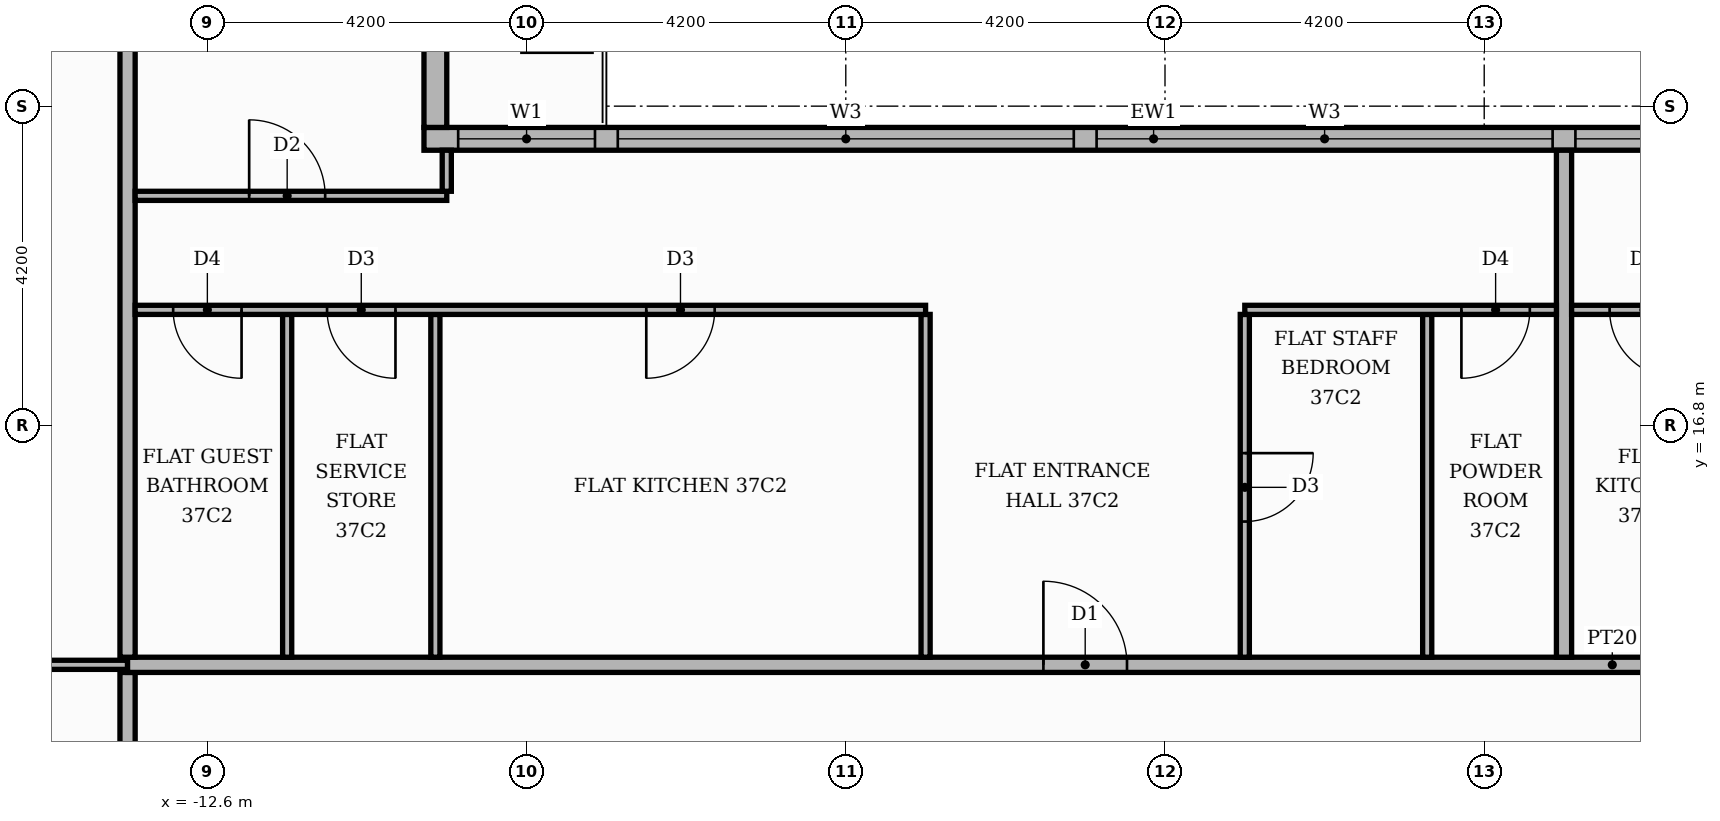
"""IFC4 building model, lengths in metres.
Left out: names, types, materials, properties, quantities, classifications, styles, units other than length and angle.
Written with IfcOpenShell. Run it as: python <this file> out.ifc"""

import sys

from ifc_helpers import new_model, si_unit, direction, frame, frame_2d, origin, place, context, subcontext, project, spatial, rectangle, extrude, element, fill, save


model = new_model("IFC4")
c1 = context("Model", 3, precision=1e-05, world=origin(), true_north=direction((0.0, 1.0)))
c2 = subcontext(c1, "Body", "Model", "MODEL_VIEW")
j1 = project(units=[si_unit("LENGTHUNIT", "METRE"), si_unit("PLANEANGLEUNIT", "RADIAN")], contexts=[c1])
p1 = place(None, origin())
s1 = spatial("IfcSite", under=j1, at=p1, CompositionType="ELEMENT")
p2 = place(p1, origin())
s2 = spatial("IfcBuilding", under=s1, at=p2, CompositionType="ELEMENT")
p3 = place(p2, frame((0.0, 0.0, 157.2)))
s3 = spatial("IfcBuildingStorey", under=s2, at=p3, CompositionType="ELEMENT", Elevation=157.2)
p4 = place(p3, frame((9.45, 20.57, 0.0), z_axis=(0.0, 0.0, 1.0), x_axis=(-1.0, 0.0, 0.0)))
e1 = element("IfcWall", 1, at=p4, inside=s3, PredefinedType="STANDARD", context=c2, shape_type="SweptSolid", body=[
    extrude(rectangle(XDim=19.2, YDim=0.3, at=frame_2d((9.6, 0.0))), origin(), (0.0, 0.0, 1.0), 3.48),
])
p5 = place(p4, frame((0.15, 0.0, 0.9)))
e2 = element("IfcOpeningElement", 2, at=p5, cuts=e1, PredefinedType="OPENING", context=c2, shape_type="SweptSolid", body=[
    extrude(rectangle(XDim=3.9, YDim=2.1, at=frame_2d((1.95, 1.05))), frame((0.0, 0.16, 0.0), z_axis=(0.0, -1.0, 0.0), x_axis=(1.0, 0.0, 0.0)), (0.0, 0.0, 1.0), 0.32),
])
p6 = place(p4, frame((4.35, 0.0, 0.9)))
e3 = element("IfcOpeningElement", 3, at=p6, cuts=e1, PredefinedType="OPENING", context=c2, shape_type="SweptSolid", body=[
    extrude(rectangle(XDim=6.0, YDim=2.1, at=frame_2d((3.0, 1.05))), frame((0.0, 0.16, 0.0), z_axis=(0.0, -1.0, 0.0), x_axis=(1.0, 0.0, 0.0)), (0.0, 0.0, 1.0), 0.32),
])
p7 = place(p4, frame((10.65, 0.0, 0.9)))
e4 = element("IfcOpeningElement", 4, at=p7, cuts=e1, PredefinedType="OPENING", context=c2, shape_type="SweptSolid", body=[
    extrude(rectangle(XDim=6.0, YDim=2.1, at=frame_2d((3.0, 1.05))), frame((0.0, 0.16, 0.0), z_axis=(0.0, -1.0, 0.0), x_axis=(1.0, 0.0, 0.0)), (0.0, 0.0, 1.0), 0.32),
])
p8 = place(p4, frame((16.95, 0.0, 0.9)))
e5 = element("IfcOpeningElement", 5, at=p8, cuts=e1, PredefinedType="OPENING", context=c2, shape_type="SweptSolid", body=[
    extrude(rectangle(XDim=1.8, YDim=2.1, at=frame_2d((0.9, 1.05))), frame((0.0, 0.16, 0.0), z_axis=(0.0, -1.0, 0.0), x_axis=(1.0, 0.0, 0.0)), (0.0, 0.0, 1.0), 0.32),
])
p9 = place(p3, frame((-9.6, 20.72, 0.0), z_axis=(0.0, 0.0, 1.0), x_axis=(0.0, 1.0, 0.0)))
e6 = element("IfcWall", 6, at=p9, inside=s3, PredefinedType="STANDARD", context=c2, shape_type="SweptSolid", body=[
    extrude(rectangle(XDim=5.0, YDim=0.3, at=frame_2d((2.5, 0.0))), origin(), (0.0, 0.0, 1.0), 3.48),
])
p10 = place(p9, frame((1.48, 0.0, 0.0)))
e7 = element("IfcOpeningElement", 7, at=p10, cuts=e6, PredefinedType="OPENING", context=c2, shape_type="SweptSolid", body=[
    extrude(rectangle(XDim=1.8, YDim=2.4, at=frame_2d((0.9, 1.2))), frame((0.0, 0.16, 0.0), z_axis=(0.0, -1.0, 0.0), x_axis=(1.0, 0.0, 0.0)), (0.0, 0.0, 1.0), 0.32),
])
p11 = place(p3, frame((-13.65, 11.1, 0.0), z_axis=(0.0, 0.0, 1.0), x_axis=(0.0, 1.0, 0.0)))
e8 = element("IfcWall", 8, at=p11, inside=s3, PredefinedType="PARTITIONING", context=c2, shape_type="SweptSolid", body=[
    extrude(rectangle(XDim=2.45, YDim=0.2, at=frame_2d((1.225, 0.0))), origin(), (0.0, 0.0, 1.0), 3.48),
])
p12 = place(p3, frame((-19.82, 13.65, 0.0), z_axis=(0.0, 0.0, 1.0), x_axis=(1.0, 0.0, 0.0)))
e9 = element("IfcWall", 9, at=p12, inside=s3, PredefinedType="PARTITIONING", context=c2, shape_type="SweptSolid", body=[
    extrude(rectangle(XDim=6.17, YDim=0.12, at=frame_2d((3.085, 0.0))), origin(), (0.0, 0.0, 1.0), 3.48),
])
p13 = place(p12, frame((2.635, 0.0, 0.0)))
e10 = element("IfcOpeningElement", 10, at=p13, cuts=e9, PredefinedType="OPENING", context=c2, shape_type="SweptSolid", body=[
    extrude(rectangle(XDim=0.9, YDim=2.1, at=frame_2d((0.45, 1.05))), frame((0.0, 0.07, 0.0), z_axis=(0.0, -1.0, 0.0), x_axis=(1.0, 0.0, 0.0)), (0.0, 0.0, 1.0), 0.14),
])
p14 = place(p3, frame((-13.65, 13.65, 0.0), z_axis=(0.0, 0.0, 1.0), x_axis=(1.0, 0.0, 0.0)))
e11 = element("IfcWall", 11, at=p14, inside=s3, PredefinedType="PARTITIONING", context=c2, shape_type="SweptSolid", body=[
    extrude(rectangle(XDim=39.07, YDim=0.2, at=frame_2d((19.535, 0.0))), origin(), (0.0, 0.0, 1.0), 3.48),
])
p15 = place(p14, frame((24.65, 0.0, 0.0)))
e12 = element("IfcOpeningElement", 12, at=p15, cuts=e11, PredefinedType="OPENING", context=c2, shape_type="SweptSolid", body=[
    extrude(rectangle(XDim=1.1, YDim=2.4, at=frame_2d((0.55, 1.2))), frame((0.0, 0.11, 0.0), z_axis=(0.0, -1.0, 0.0), x_axis=(1.0, 0.0, 0.0)), (0.0, 0.0, 1.0), 0.22),
])
p16 = place(p14, frame((12.05, 0.0, 0.0)))
e13 = element("IfcOpeningElement", 13, at=p16, cuts=e11, PredefinedType="OPENING", context=c2, shape_type="SweptSolid", body=[
    extrude(rectangle(XDim=1.1, YDim=2.4, at=frame_2d((0.55, 1.2))), frame((0.0, 0.11, 0.0), z_axis=(0.0, -1.0, 0.0), x_axis=(1.0, 0.0, 0.0)), (0.0, 0.0, 1.0), 0.22),
])
p17 = place(p3, frame((-13.65, 13.75, 0.0), z_axis=(0.0, 0.0, 1.0), x_axis=(0.0, 1.0, 0.0)))
e14 = element("IfcWall", 14, at=p17, inside=s3, PredefinedType="PARTITIONING", context=c2, shape_type="SweptSolid", body=[
    extrude(rectangle(XDim=11.67, YDim=0.2, at=frame_2d((5.835, 0.0))), origin(), (0.0, 0.0, 1.0), 3.48),
])
for number, where, z_axis, x_axis in (
    (15, (-11.55, 13.75, 0.0), (0.0, 0.0, 1.0), (0.0, 1.0, 0.0)),
    (16, (-9.6, 13.75, 0.0), (0.0, 0.0, 1.0), (0.0, 1.0, 0.0)),
    (17, (-3.15, 13.75, 0.0), (0.0, 0.0, 1.0), (0.0, 1.0, 0.0)),
):
    element("IfcWall", number, at=place(p3, frame(where, z_axis=z_axis, x_axis=x_axis)), inside=s3, PredefinedType="PARTITIONING", context=c2, shape_type="SweptSolid", body=[
        extrude(rectangle(XDim=4.51, YDim=0.12, at=frame_2d((2.255, 0.0))), origin(), (0.0, 0.0, 1.0), 3.48),
    ])
p18 = place(p3, frame((1.05, 13.75, 0.0), z_axis=(0.0, 0.0, 1.0), x_axis=(0.0, 1.0, 0.0)))
e18 = element("IfcWall", 18, at=p18, inside=s3, PredefinedType="PARTITIONING", context=c2, shape_type="SweptSolid", body=[
    extrude(rectangle(XDim=4.51, YDim=0.12, at=frame_2d((2.255, 0.0))), origin(), (0.0, 0.0, 1.0), 3.48),
])
p19 = place(p18, frame((1.785, 0.0, 0.0)))
e19 = element("IfcOpeningElement", 19, at=p19, cuts=e18, PredefinedType="OPENING", context=c2, shape_type="SweptSolid", body=[
    extrude(rectangle(XDim=0.9, YDim=2.1, at=frame_2d((0.45, 1.05))), frame((0.0, 0.07, 0.0), z_axis=(0.0, -1.0, 0.0), x_axis=(1.0, 0.0, 0.0)), (0.0, 0.0, 1.0), 0.14),
])
p20 = place(p3, frame((3.45, 13.75, 0.0), z_axis=(0.0, 0.0, 1.0), x_axis=(0.0, 1.0, 0.0)))
e20 = element("IfcWall", 20, at=p20, inside=s3, PredefinedType="PARTITIONING", context=c2, shape_type="SweptSolid", body=[
    extrude(rectangle(XDim=4.51, YDim=0.12, at=frame_2d((2.255, 0.0))), origin(), (0.0, 0.0, 1.0), 3.48),
])
p21 = place(p3, frame((5.25, 13.75, 0.0), z_axis=(0.0, 0.0, 1.0), x_axis=(0.0, 1.0, 0.0)))
e21 = element("IfcWall", 21, at=p21, inside=s3, PredefinedType="PARTITIONING", context=c2, shape_type="SweptSolid", body=[
    extrude(rectangle(XDim=6.67, YDim=0.2, at=frame_2d((3.335, 0.0))), origin(), (0.0, 0.0, 1.0), 3.48),
])
p22 = place(p3, frame((-13.55, 18.32, 0.0), z_axis=(0.0, 0.0, 1.0), x_axis=(1.0, 0.0, 0.0)))
e22 = element("IfcWall", 22, at=p22, inside=s3, PredefinedType="PARTITIONING", context=c2, shape_type="SweptSolid", body=[
    extrude(rectangle(XDim=10.4, YDim=0.12, at=frame_2d((5.2, 0.0))), origin(), (0.0, 0.0, 1.0), 3.48),
])
p23 = place(p22, frame((6.725, 0.0, 0.0)))
e23 = element("IfcOpeningElement", 23, at=p23, cuts=e22, PredefinedType="OPENING", context=c2, shape_type="SweptSolid", body=[
    extrude(rectangle(XDim=0.9, YDim=2.1, at=frame_2d((0.45, 1.05))), frame((0.0, 0.07, 0.0), z_axis=(0.0, -1.0, 0.0), x_axis=(1.0, 0.0, 0.0)), (0.0, 0.0, 1.0), 0.14),
])
p24 = place(p22, frame((2.525, 0.0, 0.0)))
e24 = element("IfcOpeningElement", 24, at=p24, cuts=e22, PredefinedType="OPENING", context=c2, shape_type="SweptSolid", body=[
    extrude(rectangle(XDim=0.9, YDim=2.1, at=frame_2d((0.45, 1.05))), frame((0.0, 0.07, 0.0), z_axis=(0.0, -1.0, 0.0), x_axis=(1.0, 0.0, 0.0)), (0.0, 0.0, 1.0), 0.14),
])
p25 = place(p22, frame((0.5, 0.0, 0.0)))
e25 = element("IfcOpeningElement", 25, at=p25, cuts=e22, PredefinedType="OPENING", context=c2, shape_type="SweptSolid", body=[
    extrude(rectangle(XDim=0.9, YDim=2.1, at=frame_2d((0.45, 1.05))), frame((0.0, 0.07, 0.0), z_axis=(0.0, -1.0, 0.0), x_axis=(1.0, 0.0, 0.0)), (0.0, 0.0, 1.0), 0.14),
])
p26 = place(p3, frame((1.05, 18.32, 0.0), z_axis=(0.0, 0.0, 1.0), x_axis=(1.0, 0.0, 0.0)))
e26 = element("IfcWall", 26, at=p26, inside=s3, PredefinedType="PARTITIONING", context=c2, shape_type="SweptSolid", body=[
    extrude(rectangle(XDim=4.1, YDim=0.12, at=frame_2d((2.05, 0.0))), origin(), (0.0, 0.0, 1.0), 3.48),
])
p27 = place(p26, frame((2.85, 0.0, 0.0)))
e27 = element("IfcOpeningElement", 27, at=p27, cuts=e26, PredefinedType="OPENING", context=c2, shape_type="SweptSolid", body=[
    extrude(rectangle(XDim=0.9, YDim=2.1, at=frame_2d((0.45, 1.05))), frame((0.0, 0.07, 0.0), z_axis=(0.0, -1.0, 0.0), x_axis=(1.0, 0.0, 0.0)), (0.0, 0.0, 1.0), 0.14),
])
p28 = place(p3, frame((5.35, 18.32, 0.0), z_axis=(0.0, 0.0, 1.0), x_axis=(1.0, 0.0, 0.0)))
e28 = element("IfcWall", 28, at=p28, inside=s3, PredefinedType="PARTITIONING", context=c2, shape_type="SweptSolid", body=[
    extrude(rectangle(XDim=4.1, YDim=0.12, at=frame_2d((2.05, 0.0))), origin(), (0.0, 0.0, 1.0), 3.48),
])
p29 = place(p28, frame((0.5, 0.0, 0.0)))
e29 = element("IfcOpeningElement", 29, at=p29, cuts=e28, PredefinedType="OPENING", context=c2, shape_type="SweptSolid", body=[
    extrude(rectangle(XDim=0.9, YDim=2.1, at=frame_2d((0.45, 1.05))), frame((0.0, 0.07, 0.0), z_axis=(0.0, -1.0, 0.0), x_axis=(1.0, 0.0, 0.0)), (0.0, 0.0, 1.0), 0.14),
])
p30 = place(p3, frame((-13.55, 19.82, 0.0), z_axis=(0.0, 0.0, 1.0), x_axis=(1.0, 0.0, 0.0)))
e30 = element("IfcWall", 30, at=p30, inside=s3, PredefinedType="PARTITIONING", context=c2, shape_type="SweptSolid", body=[
    extrude(rectangle(XDim=4.1, YDim=0.12, at=frame_2d((2.05, 0.0))), origin(), (0.0, 0.0, 1.0), 3.48),
])
p31 = place(p30, frame((1.5, 0.0, 0.0)))
e31 = element("IfcOpeningElement", 31, at=p31, cuts=e30, PredefinedType="OPENING", context=c2, shape_type="SweptSolid", body=[
    extrude(rectangle(XDim=1.0, YDim=2.1, at=frame_2d((0.5, 1.05))), frame((0.0, 0.07, 0.0), z_axis=(0.0, -1.0, 0.0), x_axis=(1.0, 0.0, 0.0)), (0.0, 0.0, 1.0), 0.14),
])
p32 = place(p3, frame((-9.45, 19.88, 0.0), z_axis=(0.0, 0.0, 1.0), x_axis=(0.0, 1.0, 0.0)))
e32 = element("IfcWall", 32, at=p32, inside=s3, PredefinedType="PARTITIONING", context=c2, shape_type="SweptSolid", body=[
    extrude(rectangle(XDim=0.54, YDim=0.12, at=frame_2d((0.27, 0.0))), origin(), (0.0, 0.0, 1.0), 3.48),
])
p33 = place(p5, origin())
e33 = element("IfcWindow", 33, at=p33, inside=s3, PartitioningType="SINGLE_PANEL", PredefinedType="WINDOW", context=c2, shape_type="SweptSolid", body=[
    extrude(rectangle(XDim=3.9, YDim=2.1, at=frame_2d((1.95, 1.05))), frame((0.0, 0.03, 0.0), z_axis=(0.0, -1.0, 0.0), x_axis=(1.0, 0.0, 0.0)), (0.0, 0.0, 1.0), 0.06),
])
fill(e2, e33)
p34 = place(p6, origin())
e34 = element("IfcWindow", 34, at=p34, inside=s3, PartitioningType="SINGLE_PANEL", PredefinedType="WINDOW", context=c2, shape_type="SweptSolid", body=[
    extrude(rectangle(XDim=6.0, YDim=2.1, at=frame_2d((3.0, 1.05))), frame((0.0, 0.03, 0.0), z_axis=(0.0, -1.0, 0.0), x_axis=(1.0, 0.0, 0.0)), (0.0, 0.0, 1.0), 0.06),
])
fill(e3, e34)
p35 = place(p7, origin())
e35 = element("IfcWindow", 35, at=p35, inside=s3, PartitioningType="SINGLE_PANEL", PredefinedType="WINDOW", context=c2, shape_type="SweptSolid", body=[
    extrude(rectangle(XDim=6.0, YDim=2.1, at=frame_2d((3.0, 1.05))), frame((0.0, 0.03, 0.0), z_axis=(0.0, -1.0, 0.0), x_axis=(1.0, 0.0, 0.0)), (0.0, 0.0, 1.0), 0.06),
])
fill(e4, e35)
p36 = place(p8, origin())
e36 = element("IfcWindow", 36, at=p36, inside=s3, PartitioningType="SINGLE_PANEL", PredefinedType="WINDOW", context=c2, shape_type="SweptSolid", body=[
    extrude(rectangle(XDim=1.8, YDim=2.1, at=frame_2d((0.9, 1.05))), frame((0.0, 0.03, 0.0), z_axis=(0.0, -1.0, 0.0), x_axis=(1.0, 0.0, 0.0)), (0.0, 0.0, 1.0), 0.06),
])
fill(e5, e36)
p37 = place(p29, frame((0.9, 0.0, 0.0), z_axis=(0.0, 0.0, 1.0), x_axis=(-1.0, 0.0, 0.0)))
e37 = element("IfcDoor", 37, at=p37, inside=s3, OperationType="SINGLE_SWING_RIGHT", PredefinedType="DOOR", context=c2, shape_type="SweptSolid", body=[
    extrude(rectangle(XDim=0.9, YDim=2.1, at=frame_2d((0.45, 1.05))), frame((0.0, 0.025, 0.0), z_axis=(0.0, -1.0, 0.0), x_axis=(1.0, 0.0, 0.0)), (0.0, 0.0, 1.0), 0.05),
])
fill(e29, e37)
p38 = place(p16, origin())
e38 = element("IfcDoor", 38, at=p38, inside=s3, OperationType="SINGLE_SWING_LEFT", PredefinedType="DOOR", context=c2, shape_type="SweptSolid", body=[
    extrude(rectangle(XDim=1.1, YDim=2.4, at=frame_2d((0.55, 1.2))), frame((0.0, 0.025, 0.0), z_axis=(0.0, -1.0, 0.0), x_axis=(1.0, 0.0, 0.0)), (0.0, 0.0, 1.0), 0.05),
])
fill(e13, e38)
p39 = place(p27, frame((0.9, 0.0, 0.0), z_axis=(0.0, 0.0, 1.0), x_axis=(-1.0, 0.0, 0.0)))
e39 = element("IfcDoor", 39, at=p39, inside=s3, OperationType="SINGLE_SWING_LEFT", PredefinedType="DOOR", context=c2, shape_type="SweptSolid", body=[
    extrude(rectangle(XDim=0.9, YDim=2.1, at=frame_2d((0.45, 1.05))), frame((0.0, 0.025, 0.0), z_axis=(0.0, -1.0, 0.0), x_axis=(1.0, 0.0, 0.0)), (0.0, 0.0, 1.0), 0.05),
])
fill(e27, e39)
p40 = place(p19, frame((0.9, 0.0, 0.0), z_axis=(0.0, 0.0, 1.0), x_axis=(-1.0, 0.0, 0.0)))
e40 = element("IfcDoor", 40, at=p40, inside=s3, OperationType="SINGLE_SWING_RIGHT", PredefinedType="DOOR", context=c2, shape_type="SweptSolid", body=[
    extrude(rectangle(XDim=0.9, YDim=2.1, at=frame_2d((0.45, 1.05))), frame((0.0, 0.025, 0.0), z_axis=(0.0, -1.0, 0.0), x_axis=(1.0, 0.0, 0.0)), (0.0, 0.0, 1.0), 0.05),
])
fill(e19, e40)
p41 = place(p23, frame((0.9, 0.0, 0.0), z_axis=(0.0, 0.0, 1.0), x_axis=(-1.0, 0.0, 0.0)))
e41 = element("IfcDoor", 41, at=p41, inside=s3, OperationType="SINGLE_SWING_LEFT", PredefinedType="DOOR", context=c2, shape_type="SweptSolid", body=[
    extrude(rectangle(XDim=0.9, YDim=2.1, at=frame_2d((0.45, 1.05))), frame((0.0, 0.025, 0.0), z_axis=(0.0, -1.0, 0.0), x_axis=(1.0, 0.0, 0.0)), (0.0, 0.0, 1.0), 0.05),
])
fill(e23, e41)
p42 = place(p24, frame((0.9, 0.0, 0.0), z_axis=(0.0, 0.0, 1.0), x_axis=(-1.0, 0.0, 0.0)))
e42 = element("IfcDoor", 42, at=p42, inside=s3, OperationType="SINGLE_SWING_RIGHT", PredefinedType="DOOR", context=c2, shape_type="SweptSolid", body=[
    extrude(rectangle(XDim=0.9, YDim=2.1, at=frame_2d((0.45, 1.05))), frame((0.0, 0.025, 0.0), z_axis=(0.0, -1.0, 0.0), x_axis=(1.0, 0.0, 0.0)), (0.0, 0.0, 1.0), 0.05),
])
fill(e24, e42)
p43 = place(p25, frame((0.9, 0.0, 0.0), z_axis=(0.0, 0.0, 1.0), x_axis=(-1.0, 0.0, 0.0)))
e43 = element("IfcDoor", 43, at=p43, inside=s3, OperationType="SINGLE_SWING_RIGHT", PredefinedType="DOOR", context=c2, shape_type="SweptSolid", body=[
    extrude(rectangle(XDim=0.9, YDim=2.1, at=frame_2d((0.45, 1.05))), frame((0.0, 0.025, 0.0), z_axis=(0.0, -1.0, 0.0), x_axis=(1.0, 0.0, 0.0)), (0.0, 0.0, 1.0), 0.05),
])
fill(e25, e43)
p44 = place(p31, origin())
e44 = element("IfcDoor", 44, at=p44, inside=s3, OperationType="SINGLE_SWING_LEFT", PredefinedType="DOOR", context=c2, shape_type="SweptSolid", body=[
    extrude(rectangle(XDim=1.0, YDim=2.1, at=frame_2d((0.5, 1.05))), frame((0.0, 0.025, 0.0), z_axis=(0.0, -1.0, 0.0), x_axis=(1.0, 0.0, 0.0)), (0.0, 0.0, 1.0), 0.05),
])
fill(e31, e44)
save(model, sys.argv[1])
